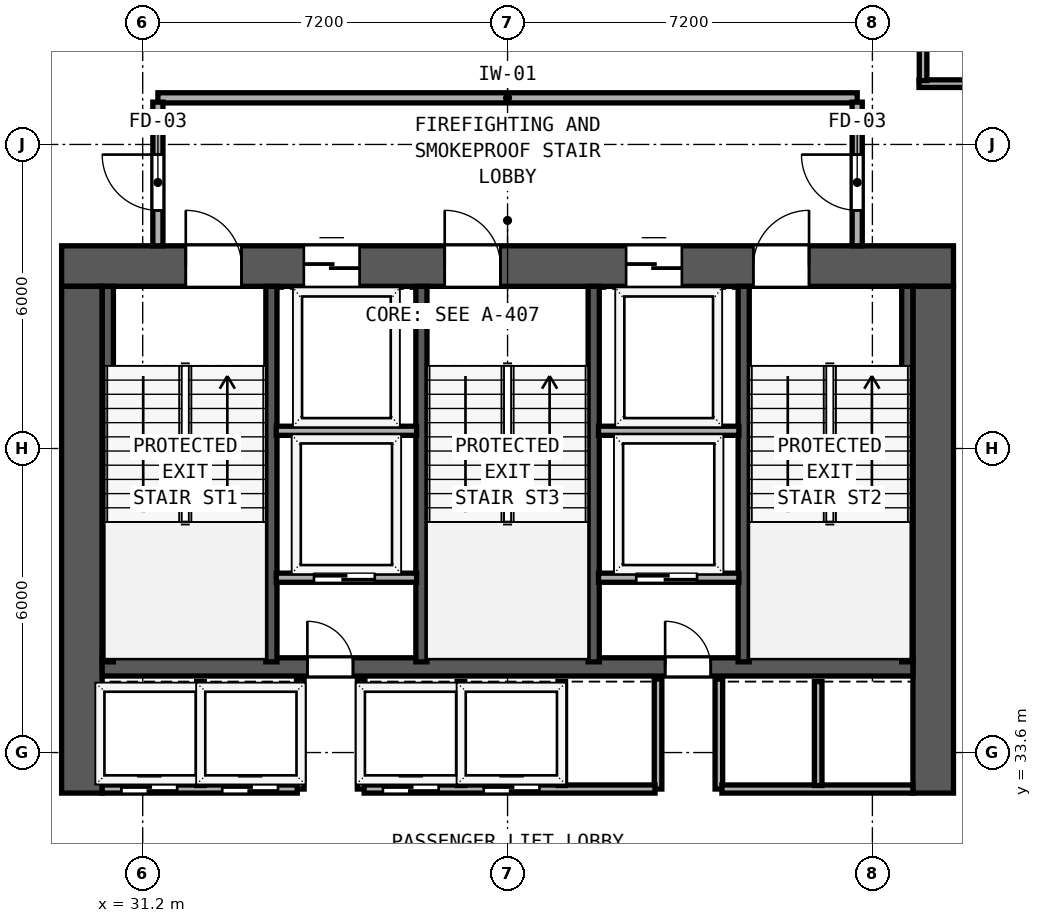
"""IFC4 building model, lengths in metres.
Left out: names, types, materials, properties, quantities, classifications, styles, units other than length and angle.
Written with IfcOpenShell. Run it as: python <this file> out.ifc"""

import sys

from ifc_helpers import new_model, si_unit, direction, frame, frame_2d, origin, place, context, subcontext, project, spatial, rectangle, extrude, element, fill, save


model = new_model("IFC4")
c1 = context("Model", 3, precision=1e-05, world=origin(), true_north=direction((0.0, 1.0)))
c2 = subcontext(c1, "Body", "Model", "MODEL_VIEW")
j1 = project(units=[si_unit("LENGTHUNIT", "METRE"), si_unit("PLANEANGLEUNIT", "RADIAN")], contexts=[c1])
p1 = place(None, origin())
s1 = spatial("IfcSite", under=j1, at=p1, CompositionType="ELEMENT")
p2 = place(p1, origin())
s2 = spatial("IfcBuilding", under=s1, at=p2, CompositionType="ELEMENT")
p3 = place(p2, frame((0.0, 0.0, 19.8)))
s3 = spatial("IfcBuildingStorey", under=s2, at=p3, CompositionType="ELEMENT", Elevation=19.8)
p4 = place(p3, frame((29.6, 43.2, 0.0), z_axis=(0.0, 0.0, 1.0), x_axis=(1.0, 0.0, 0.0)))
e1 = element("IfcWall", 1, at=p4, inside=s3, PredefinedType="SHEAR", context=c2, shape_type="SweptSolid", body=[
    extrude(rectangle(XDim=17.6, YDim=0.8, at=frame_2d((8.8, 0.0))), origin(), (0.0, 0.0, 1.0), 4.0),
])
p5 = place(p4, frame((2.45, 0.0, 0.0)))
e2 = element("IfcOpeningElement", 2, at=p5, cuts=e1, PredefinedType="OPENING", context=c2, shape_type="SweptSolid", body=[
    extrude(rectangle(XDim=1.1, YDim=2.15, at=frame_2d((0.55, 1.075))), frame((0.0, 0.41, 0.0), z_axis=(0.0, -1.0, 0.0), x_axis=(1.0, 0.0, 0.0)), (0.0, 0.0, 1.0), 0.82),
])
p6 = place(p4, frame((7.56, 0.0, 0.0)))
e3 = element("IfcOpeningElement", 3, at=p6, cuts=e1, PredefinedType="OPENING", context=c2, shape_type="SweptSolid", body=[
    extrude(rectangle(XDim=1.1, YDim=2.15, at=frame_2d((0.55, 1.075))), frame((0.0, 0.41, 0.0), z_axis=(0.0, -1.0, 0.0), x_axis=(1.0, 0.0, 0.0)), (0.0, 0.0, 1.0), 0.82),
])
p7 = place(p4, frame((13.65, 0.0, 0.0)))
e4 = element("IfcOpeningElement", 4, at=p7, cuts=e1, PredefinedType="OPENING", context=c2, shape_type="SweptSolid", body=[
    extrude(rectangle(XDim=1.1, YDim=2.15, at=frame_2d((0.55, 1.075))), frame((0.0, 0.41, 0.0), z_axis=(0.0, -1.0, 0.0), x_axis=(1.0, 0.0, 0.0)), (0.0, 0.0, 1.0), 0.82),
])
p8 = place(p4, frame((4.78, 0.0, 0.0)))
e5 = element("IfcOpeningElement", 5, at=p8, cuts=e1, PredefinedType="OPENING", context=c2, shape_type="SweptSolid", body=[
    extrude(rectangle(XDim=1.1, YDim=2.2, at=frame_2d((0.55, 1.1))), frame((0.0, 0.41, 0.0), z_axis=(0.0, -1.0, 0.0), x_axis=(1.0, 0.0, 0.0)), (0.0, 0.0, 1.0), 0.82),
])
p9 = place(p4, frame((11.14, 0.0, 0.0)))
e6 = element("IfcOpeningElement", 6, at=p9, cuts=e1, PredefinedType="OPENING", context=c2, shape_type="SweptSolid", body=[
    extrude(rectangle(XDim=1.1, YDim=2.2, at=frame_2d((0.55, 1.1))), frame((0.0, 0.41, 0.0), z_axis=(0.0, -1.0, 0.0), x_axis=(1.0, 0.0, 0.0)), (0.0, 0.0, 1.0), 0.82),
])
for number, where, z_axis, x_axis in (
    (7, (30.0, 32.8, 0.0), (0.0, 0.0, 1.0), (0.0, 1.0, 0.0)),
    (8, (46.8, 32.8, 0.0), (0.0, 0.0, 1.0), (0.0, 1.0, 0.0)),
):
    element("IfcWall", number, at=place(p3, frame(where, z_axis=z_axis, x_axis=x_axis)), inside=s3, PredefinedType="SHEAR", context=c2, shape_type="SweptSolid", body=[
        extrude(rectangle(XDim=10.0, YDim=0.8, at=frame_2d((5.0, 0.0))), origin(), (0.0, 0.0, 1.0), 4.0),
    ])
p10 = place(p3, frame((30.4, 35.29, 0.0), z_axis=(0.0, 0.0, 1.0), x_axis=(1.0, 0.0, 0.0)))
e9 = element("IfcWall", 9, at=p10, inside=s3, PredefinedType="SHEAR", context=c2, shape_type="SweptSolid", body=[
    extrude(rectangle(XDim=16.0, YDim=0.36, at=frame_2d((8.0, 0.0))), origin(), (0.0, 0.0, 1.0), 4.0),
])
p11 = place(p10, frame((4.95, 0.0, 0.0), z_axis=(0.0, 0.0, 1.0), x_axis=(-1.0, 0.0, 0.0)))
e10 = element("IfcOpeningElement", 10, at=p11, cuts=e9, PredefinedType="OPENING", context=c2, shape_type="SweptSolid", body=[
    extrude(rectangle(XDim=0.9, YDim=2.1, at=frame_2d((0.45, 1.05))), frame((0.0, 0.19, 0.0), z_axis=(0.0, -1.0, 0.0), x_axis=(1.0, 0.0, 0.0)), (0.0, 0.0, 1.0), 0.38),
])
p12 = place(p10, frame((12.01, 0.0, 0.0), z_axis=(0.0, 0.0, 1.0), x_axis=(-1.0, 0.0, 0.0)))
e11 = element("IfcOpeningElement", 11, at=p12, cuts=e9, PredefinedType="OPENING", context=c2, shape_type="SweptSolid", body=[
    extrude(rectangle(XDim=0.9, YDim=2.1, at=frame_2d((0.45, 1.05))), frame((0.0, 0.19, 0.0), z_axis=(0.0, -1.0, 0.0), x_axis=(1.0, 0.0, 0.0)), (0.0, 0.0, 1.0), 0.38),
])
for number, where, z_axis, x_axis in (
    (12, (30.512, 35.39, 0.0), (0.0, 0.0, 1.0), (0.0, 1.0, 0.0)),
    (13, (33.74, 35.39, 0.0), (0.0, 0.0, 1.0), (0.0, 1.0, 0.0)),
    (14, (36.7, 35.39, 0.0), (0.0, 0.0, 1.0), (0.0, 1.0, 0.0)),
    (15, (40.1, 35.39, 0.0), (0.0, 0.0, 1.0), (0.0, 1.0, 0.0)),
    (16, (43.06, 35.39, 0.0), (0.0, 0.0, 1.0), (0.0, 1.0, 0.0)),
    (17, (46.288, 35.39, 0.0), (0.0, 0.0, 1.0), (0.0, 1.0, 0.0)),
):
    element("IfcWall", number, at=place(p3, frame(where, z_axis=z_axis, x_axis=x_axis)), inside=s3, PredefinedType="SHEAR", context=c2, shape_type="SweptSolid", body=[
        extrude(rectangle(XDim=7.41, YDim=0.22, at=frame_2d((3.705, 0.0))), origin(), (0.0, 0.0, 1.0), 4.0),
    ])
p13 = place(p3, frame((31.5, 46.52, 0.0), z_axis=(0.0, 0.0, 1.0), x_axis=(1.0, 0.0, 0.0)))
e18 = element("IfcWall", 18, at=p13, inside=s3, PredefinedType="SOLIDWALL", context=c2, shape_type="SweptSolid", body=[
    extrude(rectangle(XDim=13.8, YDim=0.2, at=frame_2d((6.9, 0.0))), origin(), (0.0, 0.0, 1.0), 4.0),
])
p14 = place(p3, frame((31.5, 43.6, 0.0), z_axis=(0.0, 0.0, 1.0), x_axis=(0.0, 1.0, 0.0)))
e19 = element("IfcWall", 19, at=p14, inside=s3, PredefinedType="SOLIDWALL", context=c2, shape_type="SweptSolid", body=[
    extrude(rectangle(XDim=2.835, YDim=0.2, at=frame_2d((1.417, 0.0))), origin(), (0.0, 0.0, 1.0), 4.0),
])
p15 = place(p14, frame((1.8, 0.0, 0.0), z_axis=(0.0, 0.0, 1.0), x_axis=(-1.0, 0.0, 0.0)))
e20 = element("IfcOpeningElement", 20, at=p15, cuts=e19, PredefinedType="OPENING", context=c2, shape_type="SweptSolid", body=[
    extrude(rectangle(XDim=1.1, YDim=2.15, at=frame_2d((0.55, 1.075))), frame((0.0, 0.11, 0.0), z_axis=(0.0, -1.0, 0.0), x_axis=(1.0, 0.0, 0.0)), (0.0, 0.0, 1.0), 0.22),
])
p16 = place(p3, frame((45.3, 43.6, 0.0), z_axis=(0.0, 0.0, 1.0), x_axis=(0.0, 1.0, 0.0)))
e21 = element("IfcWall", 21, at=p16, inside=s3, PredefinedType="SOLIDWALL", context=c2, shape_type="SweptSolid", body=[
    extrude(rectangle(XDim=2.835, YDim=0.2, at=frame_2d((1.417, 0.0))), origin(), (0.0, 0.0, 1.0), 4.0),
])
p17 = place(p16, frame((0.7, 0.0, 0.0)))
e22 = element("IfcOpeningElement", 22, at=p17, cuts=e21, PredefinedType="OPENING", context=c2, shape_type="SweptSolid", body=[
    extrude(rectangle(XDim=1.1, YDim=2.15, at=frame_2d((0.55, 1.075))), frame((0.0, 0.11, 0.0), z_axis=(0.0, -1.0, 0.0), x_axis=(1.0, 0.0, 0.0)), (0.0, 0.0, 1.0), 0.22),
])
for number, where, z_axis, x_axis in (
    (23, (33.835, 39.95, 0.0), (0.0, 0.0, 1.0), (1.0, 0.0, 0.0)),
    (24, (40.195, 39.95, 0.0), (0.0, 0.0, 1.0), (1.0, 0.0, 0.0)),
):
    element("IfcWall", number, at=place(p3, frame(where, z_axis=z_axis, x_axis=x_axis)), inside=s3, PredefinedType="SOLIDWALL", context=c2, shape_type="SweptSolid", body=[
        extrude(rectangle(XDim=2.77, YDim=0.18, at=frame_2d((1.385, 0.0))), origin(), (0.0, 0.0, 1.0), 4.0),
    ])
p18 = place(p3, frame((33.835, 37.05, 0.0), z_axis=(0.0, 0.0, 1.0), x_axis=(1.0, 0.0, 0.0)))
e25 = element("IfcWall", 25, at=p18, inside=s3, PredefinedType="SOLIDWALL", context=c2, shape_type="SweptSolid", body=[
    extrude(rectangle(XDim=2.77, YDim=0.18, at=frame_2d((1.385, 0.0))), origin(), (0.0, 0.0, 1.0), 4.0),
])
p19 = place(p18, frame((1.945, 0.0, 0.0), z_axis=(0.0, 0.0, 1.0), x_axis=(-1.0, 0.0, 0.0)))
e26 = element("IfcOpeningElement", 26, at=p19, cuts=e25, PredefinedType="OPENING", context=c2, shape_type="SweptSolid", body=[
    extrude(rectangle(XDim=1.2, YDim=2.2, at=frame_2d((0.6, 1.1))), frame((0.0, 0.1, 0.0), z_axis=(0.0, -1.0, 0.0), x_axis=(1.0, 0.0, 0.0)), (0.0, 0.0, 1.0), 0.2),
])
for number, where, z_axis, x_axis in (
    (27, (34.31, 32.88, 0.0), (0.0, 0.0, 1.0), (0.0, 1.0, 0.0)),
    (28, (35.51, 32.88, 0.0), (0.0, 0.0, 1.0), (0.0, 1.0, 0.0)),
):
    element("IfcWall", number, at=place(p3, frame(where, z_axis=z_axis, x_axis=x_axis)), inside=s3, PredefinedType="SOLIDWALL", context=c2, shape_type="SweptSolid", body=[
        extrude(rectangle(XDim=2.17, YDim=0.15, at=frame_2d((1.085, 0.0))), origin(), (0.0, 0.0, 1.0), 4.0),
    ])
p20 = place(p3, frame((40.195, 37.05, 0.0), z_axis=(0.0, 0.0, 1.0), x_axis=(1.0, 0.0, 0.0)))
e29 = element("IfcWall", 29, at=p20, inside=s3, PredefinedType="SOLIDWALL", context=c2, shape_type="SweptSolid", body=[
    extrude(rectangle(XDim=2.77, YDim=0.18, at=frame_2d((1.385, 0.0))), origin(), (0.0, 0.0, 1.0), 4.0),
])
p21 = place(p20, frame((1.945, 0.0, 0.0), z_axis=(0.0, 0.0, 1.0), x_axis=(-1.0, 0.0, 0.0)))
e30 = element("IfcOpeningElement", 30, at=p21, cuts=e29, PredefinedType="OPENING", context=c2, shape_type="SweptSolid", body=[
    extrude(rectangle(XDim=1.2, YDim=2.2, at=frame_2d((0.6, 1.1))), frame((0.0, 0.1, 0.0), z_axis=(0.0, -1.0, 0.0), x_axis=(1.0, 0.0, 0.0)), (0.0, 0.0, 1.0), 0.2),
])
for number, where, z_axis, x_axis in (
    (31, (41.37, 32.88, 0.0), (0.0, 0.0, 1.0), (0.0, 1.0, 0.0)),
    (32, (42.57, 32.88, 0.0), (0.0, 0.0, 1.0), (0.0, 1.0, 0.0)),
):
    element("IfcWall", number, at=place(p3, frame(where, z_axis=z_axis, x_axis=x_axis)), inside=s3, PredefinedType="SOLIDWALL", context=c2, shape_type="SweptSolid", body=[
        extrude(rectangle(XDim=2.17, YDim=0.15, at=frame_2d((1.085, 0.0))), origin(), (0.0, 0.0, 1.0), 4.0),
    ])
p22 = place(p3, frame((30.4, 32.88, 0.0), z_axis=(0.0, 0.0, 1.0), x_axis=(1.0, 0.0, 0.0)))
e33 = element("IfcWall", 33, at=p22, inside=s3, PredefinedType="SOLIDWALL", context=c2, shape_type="SweptSolid", body=[
    extrude(rectangle(XDim=3.85, YDim=0.16, at=frame_2d((1.925, 0.0))), origin(), (0.0, 0.0, 1.0), 4.0),
])
p23 = place(p22, frame((1.48, 0.0, 0.0), z_axis=(0.0, 0.0, 1.0), x_axis=(-1.0, 0.0, 0.0)))
e34 = element("IfcOpeningElement", 34, at=p23, cuts=e33, PredefinedType="OPENING", context=c2, shape_type="SweptSolid", body=[
    extrude(rectangle(XDim=1.1, YDim=2.2, at=frame_2d((0.55, 1.1))), frame((0.0, 0.09, 0.0), z_axis=(0.0, -1.0, 0.0), x_axis=(1.0, 0.0, 0.0)), (0.0, 0.0, 1.0), 0.18),
])
p24 = place(p22, frame((3.47, 0.0, 0.0), z_axis=(0.0, 0.0, 1.0), x_axis=(-1.0, 0.0, 0.0)))
e35 = element("IfcOpeningElement", 35, at=p24, cuts=e33, PredefinedType="OPENING", context=c2, shape_type="SweptSolid", body=[
    extrude(rectangle(XDim=1.1, YDim=2.2, at=frame_2d((0.55, 1.1))), frame((0.0, 0.09, 0.0), z_axis=(0.0, -1.0, 0.0), x_axis=(1.0, 0.0, 0.0)), (0.0, 0.0, 1.0), 0.18),
])
p25 = place(p3, frame((35.57, 32.88, 0.0), z_axis=(0.0, 0.0, 1.0), x_axis=(1.0, 0.0, 0.0)))
e36 = element("IfcWall", 36, at=p25, inside=s3, PredefinedType="SOLIDWALL", context=c2, shape_type="SweptSolid", body=[
    extrude(rectangle(XDim=5.74, YDim=0.16, at=frame_2d((2.87, 0.0))), origin(), (0.0, 0.0, 1.0), 4.0),
])
p26 = place(p25, frame((1.47, 0.0, 0.0), z_axis=(0.0, 0.0, 1.0), x_axis=(-1.0, 0.0, 0.0)))
e37 = element("IfcOpeningElement", 37, at=p26, cuts=e36, PredefinedType="OPENING", context=c2, shape_type="SweptSolid", body=[
    extrude(rectangle(XDim=1.1, YDim=2.2, at=frame_2d((0.55, 1.1))), frame((0.0, 0.09, 0.0), z_axis=(0.0, -1.0, 0.0), x_axis=(1.0, 0.0, 0.0)), (0.0, 0.0, 1.0), 0.18),
])
p27 = place(p25, frame((3.46, 0.0, 0.0), z_axis=(0.0, 0.0, 1.0), x_axis=(-1.0, 0.0, 0.0)))
e38 = element("IfcOpeningElement", 38, at=p27, cuts=e36, PredefinedType="OPENING", context=c2, shape_type="SweptSolid", body=[
    extrude(rectangle(XDim=1.1, YDim=2.2, at=frame_2d((0.55, 1.1))), frame((0.0, 0.09, 0.0), z_axis=(0.0, -1.0, 0.0), x_axis=(1.0, 0.0, 0.0)), (0.0, 0.0, 1.0), 0.18),
])
p28 = place(p3, frame((42.63, 32.88, 0.0), z_axis=(0.0, 0.0, 1.0), x_axis=(1.0, 0.0, 0.0)))
e39 = element("IfcWall", 39, at=p28, inside=s3, PredefinedType="SOLIDWALL", context=c2, shape_type="SweptSolid", body=[
    extrude(rectangle(XDim=3.77, YDim=0.16, at=frame_2d((1.885, 0.0))), origin(), (0.0, 0.0, 1.0), 4.0),
])
for number, where, z_axis, x_axis in (
    (40, (32.34, 32.95, 0.0), (0.0, 0.0, 1.0), (0.0, 1.0, 0.0)),
    (41, (37.48, 32.95, 0.0), (0.0, 0.0, 1.0), (0.0, 1.0, 0.0)),
    (42, (39.47, 32.95, 0.0), (0.0, 0.0, 1.0), (0.0, 1.0, 0.0)),
    (43, (44.53, 32.95, 0.0), (0.0, 0.0, 1.0), (0.0, 1.0, 0.0)),
):
    element("IfcWall", number, at=place(p3, frame(where, z_axis=z_axis, x_axis=x_axis)), inside=s3, PredefinedType="SOLIDWALL", context=c2, shape_type="SweptSolid", body=[
        extrude(rectangle(XDim=2.05, YDim=0.15, at=frame_2d((1.025, 0.0))), origin(), (0.0, 0.0, 1.0), 4.0),
    ])
p29 = place(p3, frame((46.52, 46.8, 0.0), z_axis=(0.0, 0.0, 1.0), x_axis=(1.0, 0.0, 0.0)))
e44 = element("IfcWall", 44, at=p29, inside=s3, PredefinedType="PARTITIONING", context=c2, shape_type="SweptSolid", body=[
    extrude(rectangle(XDim=22.36, YDim=0.15, at=frame_2d((11.18, 0.0))), origin(), (0.0, 0.0, 1.0), 4.0),
])
p30 = place(p29, frame((1.6, 0.0, 0.0)))
e45 = element("IfcOpeningElement", 45, at=p30, cuts=e44, PredefinedType="OPENING", context=c2, shape_type="SweptSolid", body=[
    extrude(rectangle(XDim=1.4, YDim=2.18, at=frame_2d((0.7, 1.09))), frame((0.0, 0.085, 0.0), z_axis=(0.0, -1.0, 0.0), x_axis=(1.0, 0.0, 0.0)), (0.0, 0.0, 1.0), 0.17),
])
p31 = place(p3, frame((46.6, 46.86, 0.0), z_axis=(0.0, 0.0, 1.0), x_axis=(0.0, 1.0, 0.0)))
e46 = element("IfcWall", 46, at=p31, inside=s3, PredefinedType="PARTITIONING", context=c2, shape_type="SweptSolid", body=[
    extrude(rectangle(XDim=6.928, YDim=0.15, at=frame_2d((3.464, 0.0))), origin(), (0.0, 0.0, 1.0), 4.0),
])
p32 = place(p5, origin())
e47 = element("IfcDoor", 47, at=p32, inside=s3, OperationType="SINGLE_SWING_LEFT", PredefinedType="DOOR", context=c2, shape_type="SweptSolid", body=[
    extrude(rectangle(XDim=1.1, YDim=2.15, at=frame_2d((0.55, 1.075))), frame((0.0, 0.185, 0.0), z_axis=(0.0, -1.0, 0.0), x_axis=(1.0, 0.0, 0.0)), (0.0, 0.0, 1.0), 0.05),
])
fill(e2, e47)
p33 = place(p6, origin())
e48 = element("IfcDoor", 48, at=p33, inside=s3, OperationType="SINGLE_SWING_LEFT", PredefinedType="DOOR", context=c2, shape_type="SweptSolid", body=[
    extrude(rectangle(XDim=1.1, YDim=2.15, at=frame_2d((0.55, 1.075))), frame((0.0, 0.185, 0.0), z_axis=(0.0, -1.0, 0.0), x_axis=(1.0, 0.0, 0.0)), (0.0, 0.0, 1.0), 0.05),
])
fill(e3, e48)
p34 = place(p7, origin())
e49 = element("IfcDoor", 49, at=p34, inside=s3, OperationType="SINGLE_SWING_RIGHT", PredefinedType="DOOR", context=c2, shape_type="SweptSolid", body=[
    extrude(rectangle(XDim=1.1, YDim=2.15, at=frame_2d((0.55, 1.075))), frame((0.0, 0.185, 0.0), z_axis=(0.0, -1.0, 0.0), x_axis=(1.0, 0.0, 0.0)), (0.0, 0.0, 1.0), 0.05),
])
fill(e4, e49)
p35 = place(p15, origin())
e50 = element("IfcDoor", 50, at=p35, inside=s3, OperationType="SINGLE_SWING_LEFT", PredefinedType="DOOR", context=c2, shape_type="SweptSolid", body=[
    extrude(rectangle(XDim=1.1, YDim=2.15, at=frame_2d((0.55, 1.075))), frame((0.0, 0.025, 0.0), z_axis=(0.0, -1.0, 0.0), x_axis=(1.0, 0.0, 0.0)), (0.0, 0.0, 1.0), 0.05),
])
fill(e20, e50)
p36 = place(p17, origin())
e51 = element("IfcDoor", 51, at=p36, inside=s3, OperationType="SINGLE_SWING_RIGHT", PredefinedType="DOOR", context=c2, shape_type="SweptSolid", body=[
    extrude(rectangle(XDim=1.1, YDim=2.15, at=frame_2d((0.55, 1.075))), frame((0.0, 0.025, 0.0), z_axis=(0.0, -1.0, 0.0), x_axis=(1.0, 0.0, 0.0)), (0.0, 0.0, 1.0), 0.05),
])
fill(e22, e51)
p37 = place(p8, origin())
e52 = element("IfcDoor", 52, at=p37, inside=s3, OperationType="SLIDING_TO_LEFT", PredefinedType="DOOR", context=c2, shape_type="SweptSolid", body=[
    extrude(rectangle(XDim=1.1, YDim=2.2, at=frame_2d((0.55, 1.1))), frame((0.0, 0.185, 0.0), z_axis=(0.0, -1.0, 0.0), x_axis=(1.0, 0.0, 0.0)), (0.0, 0.0, 1.0), 0.05),
])
fill(e5, e52)
p38 = place(p9, origin())
e53 = element("IfcDoor", 53, at=p38, inside=s3, OperationType="SLIDING_TO_LEFT", PredefinedType="DOOR", context=c2, shape_type="SweptSolid", body=[
    extrude(rectangle(XDim=1.1, YDim=2.2, at=frame_2d((0.55, 1.1))), frame((0.0, 0.185, 0.0), z_axis=(0.0, -1.0, 0.0), x_axis=(1.0, 0.0, 0.0)), (0.0, 0.0, 1.0), 0.05),
])
fill(e6, e53)
p39 = place(p19, origin())
e54 = element("IfcDoor", 54, at=p39, inside=s3, OperationType="SLIDING_TO_RIGHT", PredefinedType="DOOR", context=c2, shape_type="SweptSolid", body=[
    extrude(rectangle(XDim=1.2, YDim=2.2, at=frame_2d((0.6, 1.1))), frame((0.0, 0.025, 0.0), z_axis=(0.0, -1.0, 0.0), x_axis=(1.0, 0.0, 0.0)), (0.0, 0.0, 1.0), 0.05),
])
fill(e26, e54)
p40 = place(p11, origin())
e55 = element("IfcDoor", 55, at=p40, inside=s3, OperationType="SINGLE_SWING_RIGHT", PredefinedType="DOOR", context=c2, shape_type="SweptSolid", body=[
    extrude(rectangle(XDim=0.9, YDim=2.1, at=frame_2d((0.45, 1.05))), frame((0.0, 0.025, 0.0), z_axis=(0.0, -1.0, 0.0), x_axis=(1.0, 0.0, 0.0)), (0.0, 0.0, 1.0), 0.05),
])
fill(e10, e55)
p41 = place(p21, origin())
e56 = element("IfcDoor", 56, at=p41, inside=s3, OperationType="SLIDING_TO_RIGHT", PredefinedType="DOOR", context=c2, shape_type="SweptSolid", body=[
    extrude(rectangle(XDim=1.2, YDim=2.2, at=frame_2d((0.6, 1.1))), frame((0.0, 0.025, 0.0), z_axis=(0.0, -1.0, 0.0), x_axis=(1.0, 0.0, 0.0)), (0.0, 0.0, 1.0), 0.05),
])
fill(e30, e56)
p42 = place(p12, origin())
e57 = element("IfcDoor", 57, at=p42, inside=s3, OperationType="SINGLE_SWING_RIGHT", PredefinedType="DOOR", context=c2, shape_type="SweptSolid", body=[
    extrude(rectangle(XDim=0.9, YDim=2.1, at=frame_2d((0.45, 1.05))), frame((0.0, 0.025, 0.0), z_axis=(0.0, -1.0, 0.0), x_axis=(1.0, 0.0, 0.0)), (0.0, 0.0, 1.0), 0.05),
])
fill(e11, e57)
p43 = place(p23, origin())
e58 = element("IfcDoor", 58, at=p43, inside=s3, OperationType="SLIDING_TO_LEFT", PredefinedType="DOOR", context=c2, shape_type="SweptSolid", body=[
    extrude(rectangle(XDim=1.1, YDim=2.2, at=frame_2d((0.55, 1.1))), frame((0.0, 0.025, 0.0), z_axis=(0.0, -1.0, 0.0), x_axis=(1.0, 0.0, 0.0)), (0.0, 0.0, 1.0), 0.05),
])
fill(e34, e58)
p44 = place(p24, origin())
e59 = element("IfcDoor", 59, at=p44, inside=s3, OperationType="SLIDING_TO_LEFT", PredefinedType="DOOR", context=c2, shape_type="SweptSolid", body=[
    extrude(rectangle(XDim=1.1, YDim=2.2, at=frame_2d((0.55, 1.1))), frame((0.0, 0.025, 0.0), z_axis=(0.0, -1.0, 0.0), x_axis=(1.0, 0.0, 0.0)), (0.0, 0.0, 1.0), 0.05),
])
fill(e35, e59)
p45 = place(p26, origin())
e60 = element("IfcDoor", 60, at=p45, inside=s3, OperationType="SLIDING_TO_LEFT", PredefinedType="DOOR", context=c2, shape_type="SweptSolid", body=[
    extrude(rectangle(XDim=1.1, YDim=2.2, at=frame_2d((0.55, 1.1))), frame((0.0, 0.025, 0.0), z_axis=(0.0, -1.0, 0.0), x_axis=(1.0, 0.0, 0.0)), (0.0, 0.0, 1.0), 0.05),
])
fill(e37, e60)
p46 = place(p27, origin())
e61 = element("IfcDoor", 61, at=p46, inside=s3, OperationType="SLIDING_TO_LEFT", PredefinedType="DOOR", context=c2, shape_type="SweptSolid", body=[
    extrude(rectangle(XDim=1.1, YDim=2.2, at=frame_2d((0.55, 1.1))), frame((0.0, 0.025, 0.0), z_axis=(0.0, -1.0, 0.0), x_axis=(1.0, 0.0, 0.0)), (0.0, 0.0, 1.0), 0.05),
])
fill(e38, e61)
save(model, sys.argv[1])
